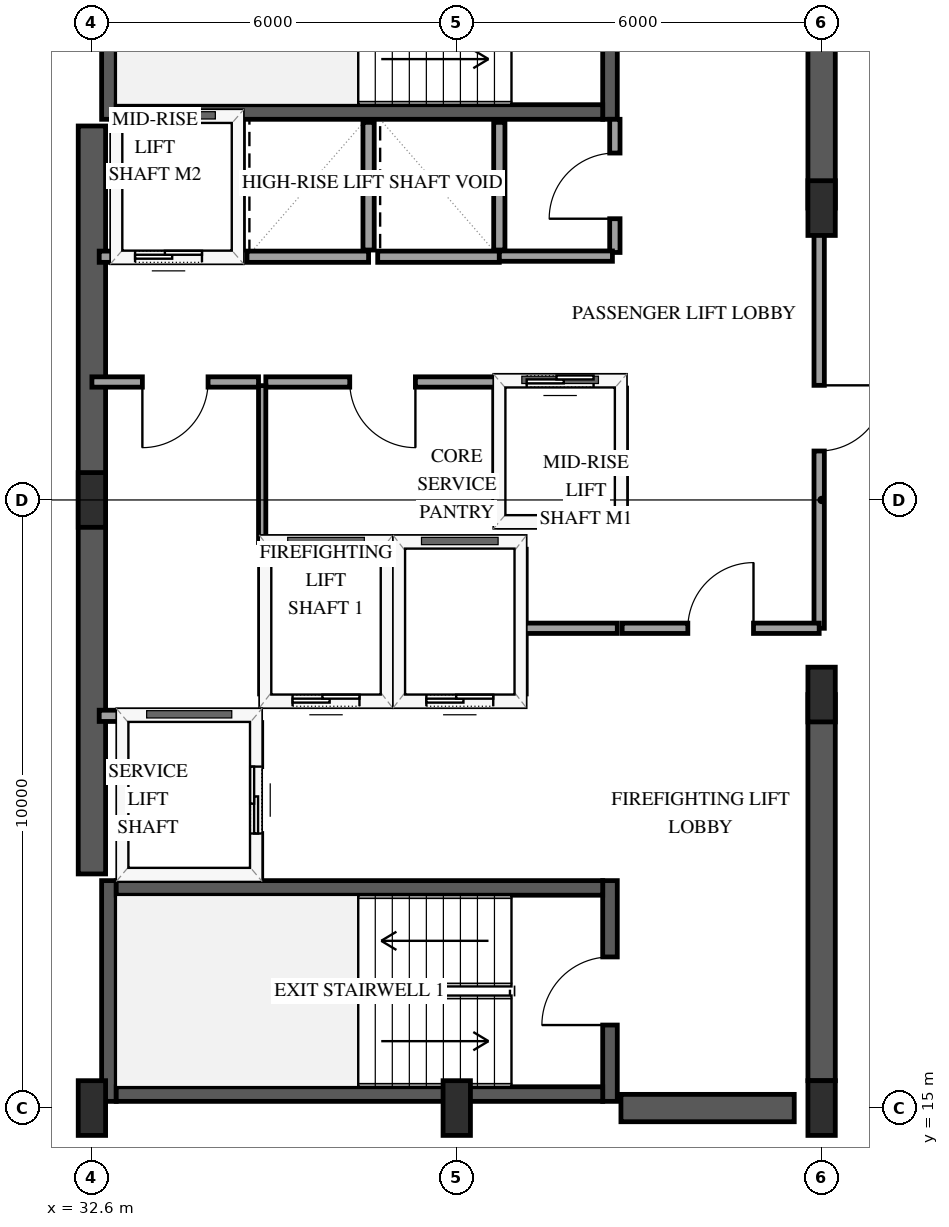
"""IFC4 building model, lengths in metres.
Left out: names, types, materials, properties, quantities, classifications, styles, units other than length and angle.
Written with IfcOpenShell. Run it as: python <this file> out.ifc"""

import sys

from ifc_helpers import new_model, si_unit, direction, frame, frame_2d, origin, origin_2d, place, context, subcontext, project, spatial, rectangle, extrude, element, fill, save


model = new_model("IFC4")
c1 = context("Model", 3, precision=1e-05, world=origin(), true_north=direction((0.0, 1.0)))
c2 = subcontext(c1, "Body", "Model", "MODEL_VIEW")
j1 = project(units=[si_unit("LENGTHUNIT", "METRE"), si_unit("PLANEANGLEUNIT", "RADIAN")], contexts=[c1])
p1 = place(None, origin())
s1 = spatial("IfcSite", under=j1, at=p1, CompositionType="ELEMENT")
p2 = place(p1, origin())
s2 = spatial("IfcBuilding", under=s1, at=p2, CompositionType="ELEMENT")
p3 = place(p2, frame((0.0, 0.0, 226.6)))
s3 = spatial("IfcBuildingStorey", under=s2, at=p3, CompositionType="ELEMENT", Elevation=226.6)
p4 = place(p3, frame((32.88, 15.11, 0.0), z_axis=(0.0, 0.0, 1.0), x_axis=(0.0, 1.0, 0.0)))
e1 = element("IfcWall", 1, at=p4, inside=s3, PredefinedType="SHEAR", context=c2, shape_type="SweptSolid", body=[
    extrude(rectangle(XDim=3.63, YDim=0.24, at=frame_2d((1.815, 0.0))), origin(), (0.0, 0.0, 1.0), 3.6),
])
p5 = place(p3, frame((41.12, 15.11, 0.0), z_axis=(0.0, 0.0, 1.0), x_axis=(0.0, 1.0, 0.0)))
e2 = element("IfcWall", 2, at=p5, inside=s3, PredefinedType="SHEAR", context=c2, shape_type="SweptSolid", body=[
    extrude(rectangle(XDim=3.63, YDim=0.24, at=frame_2d((1.815, 0.0))), origin(), (0.0, 0.0, 1.0), 3.6),
])
p6 = place(p5, frame((1.255, 0.0, 0.0)))
e3 = element("IfcOpeningElement", 3, at=p6, cuts=e2, PredefinedType="OPENING", context=c2, shape_type="SweptSolid", body=[
    extrude(rectangle(XDim=1.12, YDim=2.15, at=frame_2d((0.56, 1.075))), frame((0.0, 0.13, 0.0), z_axis=(0.0, -1.0, 0.0), x_axis=(1.0, 0.0, 0.0)), (0.0, 0.0, 1.0), 0.26),
])
for number, where, z_axis, x_axis in (
    (4, (33.0, 15.23, 0.0), (0.0, 0.0, 1.0), (1.0, 0.0, 0.0)),
    (5, (33.0, 18.62, 0.0), (0.0, 0.0, 1.0), (1.0, 0.0, 0.0)),
):
    element("IfcWall", number, at=place(p3, frame(where, z_axis=z_axis, x_axis=x_axis)), inside=s3, PredefinedType="SHEAR", context=c2, shape_type="SweptSolid", body=[
        extrude(rectangle(XDim=8.0, YDim=0.24, at=frame_2d((4.0, 0.0))), origin(), (0.0, 0.0, 1.0), 3.6),
    ])
p7 = place(p3, frame((32.88, 31.26, 0.0), z_axis=(0.0, 0.0, 1.0), x_axis=(0.0, 1.0, 0.0)))
e6 = element("IfcWall", 6, at=p7, inside=s3, PredefinedType="SHEAR", context=c2, shape_type="SweptSolid", body=[
    extrude(rectangle(XDim=3.63, YDim=0.24, at=frame_2d((1.815, 0.0))), origin(), (0.0, 0.0, 1.0), 3.6),
])
p8 = place(p3, frame((41.12, 31.26, 0.0), z_axis=(0.0, 0.0, 1.0), x_axis=(0.0, 1.0, 0.0)))
e7 = element("IfcWall", 7, at=p8, inside=s3, PredefinedType="SHEAR", context=c2, shape_type="SweptSolid", body=[
    extrude(rectangle(XDim=3.63, YDim=0.24, at=frame_2d((1.815, 0.0))), origin(), (0.0, 0.0, 1.0), 3.6),
])
p9 = place(p8, frame((1.255, 0.0, 0.0)))
e8 = element("IfcOpeningElement", 8, at=p9, cuts=e7, PredefinedType="OPENING", context=c2, shape_type="SweptSolid", body=[
    extrude(rectangle(XDim=1.12, YDim=2.15, at=frame_2d((0.56, 1.075))), frame((0.0, 0.13, 0.0), z_axis=(0.0, -1.0, 0.0), x_axis=(1.0, 0.0, 0.0)), (0.0, 0.0, 1.0), 0.26),
])
p10 = place(p3, frame((33.0, 31.38, 0.0), z_axis=(0.0, 0.0, 1.0), x_axis=(1.0, 0.0, 0.0)))
e9 = element("IfcWall", 9, at=p10, inside=s3, PredefinedType="SHEAR", context=c2, shape_type="SweptSolid", body=[
    extrude(rectangle(XDim=8.0, YDim=0.24, at=frame_2d((4.0, 0.0))), origin(), (0.0, 0.0, 1.0), 3.6),
])
p11 = place(p3, frame((32.6, 18.85, 0.0), z_axis=(0.0, 0.0, 1.0), x_axis=(0.0, 1.0, 0.0)))
e10 = element("IfcWall", 10, at=p11, inside=s3, PredefinedType="SHEAR", context=c2, shape_type="SweptSolid", body=[
    extrude(rectangle(XDim=12.3, YDim=0.45, at=frame_2d((6.15, 0.0))), origin(), (0.0, 0.0, 1.0), 3.6),
])
p12 = place(p3, frame((41.3, 15.0, 0.0), z_axis=(0.0, 0.0, 1.0), x_axis=(1.0, 0.0, 0.0)))
e11 = element("IfcWall", 11, at=p12, inside=s3, PredefinedType="SHEAR", context=c2, shape_type="SweptSolid", body=[
    extrude(rectangle(XDim=2.85, YDim=0.45, at=frame_2d((1.425, 0.0))), origin(), (0.0, 0.0, 1.0), 3.6),
])
p13 = place(p3, frame((44.6, 15.45, 0.0), z_axis=(0.0, 0.0, 1.0), x_axis=(0.0, 1.0, 0.0)))
e12 = element("IfcWall", 12, at=p13, inside=s3, PredefinedType="SHEAR", context=c2, shape_type="SweptSolid", body=[
    extrude(rectangle(XDim=6.35, YDim=0.45, at=frame_2d((3.175, 0.0))), origin(), (0.0, 0.0, 1.0), 3.6),
])
p14 = place(p3, frame((44.6, 29.8, 0.0), z_axis=(0.0, 0.0, 1.0), x_axis=(0.0, 1.0, 0.0)))
e13 = element("IfcWall", 13, at=p14, inside=s3, PredefinedType="SHEAR", context=c2, shape_type="SweptSolid", body=[
    extrude(rectangle(XDim=4.75, YDim=0.45, at=frame_2d((2.375, 0.0))), origin(), (0.0, 0.0, 1.0), 3.6),
])
for number, where, z_axis, x_axis in (
    (14, (32.6, 15.0, 0.0), (0.0, 0.0, 1.0), (1.0, 0.0, 0.0)),
    (15, (32.6, 25.0, 0.0), (0.0, 0.0, 1.0), (1.0, 0.0, 0.0)),
    (16, (38.6, 15.0, 0.0), (0.0, 0.0, 1.0), (1.0, 0.0, 0.0)),
    (17, (44.6, 15.0, 0.0), (0.0, 0.0, 1.0), (1.0, 0.0, 0.0)),
    (18, (44.6, 21.8, 0.0), (0.0, 0.0, 1.0), (1.0, 0.0, 0.0)),
    (19, (44.6, 29.8, 0.0), (0.0, 0.0, 1.0), (1.0, 0.0, 0.0)),
):
    element("IfcColumn", number, at=place(p3, frame(where, z_axis=z_axis, x_axis=x_axis)), inside=s3, PredefinedType="PILASTER", context=c2, shape_type="SweptSolid", body=[
        extrude(rectangle(XDim=0.45, YDim=0.9, at=origin_2d()), origin(), (0.0, 0.0, 1.0), 3.6),
    ])
p15 = place(p3, frame((35.45, 21.7, 0.0), z_axis=(0.0, 0.0, 1.0), x_axis=(1.0, 0.0, 0.0)))
e20 = element("IfcWall", 20, at=p15, inside=s3, PredefinedType="SOLIDWALL", context=c2, shape_type="SweptSolid", body=[
    extrude(rectangle(XDim=2.0, YDim=0.185, at=frame_2d((1.0, 0.0))), origin(), (0.0, 0.0, 1.0), 3.3),
])
p16 = place(p15, frame((0.45, 0.0, 0.0)))
e21 = element("IfcOpeningElement", 21, at=p16, cuts=e20, PredefinedType="OPENING", context=c2, shape_type="SweptSolid", body=[
    extrude(rectangle(XDim=1.1, YDim=2.15, at=frame_2d((0.55, 1.075))), frame((0.0, 0.103, 0.0), z_axis=(0.0, -1.0, 0.0), x_axis=(1.0, 0.0, 0.0)), (0.0, 0.0, 1.0), 0.205),
])
p17 = place(p3, frame((35.45, 24.3, 0.0), z_axis=(0.0, 0.0, 1.0), x_axis=(1.0, 0.0, 0.0)))
e22 = element("IfcWall", 22, at=p17, inside=s3, PredefinedType="SOLIDWALL", context=c2, shape_type="SweptSolid", body=[
    extrude(rectangle(XDim=2.0, YDim=0.185, at=frame_2d((1.0, 0.0))), origin(), (0.0, 0.0, 1.0), 3.3),
])
for number, where, z_axis, x_axis in (
    (23, (35.45, 21.81, 0.0), (0.0, 0.0, 1.0), (0.0, 1.0, 0.0)),
    (24, (37.45, 21.81, 0.0), (0.0, 0.0, 1.0), (0.0, 1.0, 0.0)),
):
    element("IfcWall", number, at=place(p3, frame(where, z_axis=z_axis, x_axis=x_axis)), inside=s3, PredefinedType="SOLIDWALL", context=c2, shape_type="SweptSolid", body=[
        extrude(rectangle(XDim=2.38, YDim=0.185, at=frame_2d((1.19, 0.0))), origin(), (0.0, 0.0, 1.0), 3.3),
    ])
p18 = place(p3, frame((37.65, 21.7, 0.0), z_axis=(0.0, 0.0, 1.0), x_axis=(1.0, 0.0, 0.0)))
e25 = element("IfcWall", 25, at=p18, inside=s3, PredefinedType="SOLIDWALL", context=c2, shape_type="SweptSolid", body=[
    extrude(rectangle(XDim=2.0, YDim=0.185, at=frame_2d((1.0, 0.0))), origin(), (0.0, 0.0, 1.0), 3.3),
])
p19 = place(p18, frame((0.45, 0.0, 0.0)))
e26 = element("IfcOpeningElement", 26, at=p19, cuts=e25, PredefinedType="OPENING", context=c2, shape_type="SweptSolid", body=[
    extrude(rectangle(XDim=1.1, YDim=2.15, at=frame_2d((0.55, 1.075))), frame((0.0, 0.103, 0.0), z_axis=(0.0, -1.0, 0.0), x_axis=(1.0, 0.0, 0.0)), (0.0, 0.0, 1.0), 0.205),
])
p20 = place(p3, frame((37.65, 24.3, 0.0), z_axis=(0.0, 0.0, 1.0), x_axis=(1.0, 0.0, 0.0)))
e27 = element("IfcWall", 27, at=p20, inside=s3, PredefinedType="SOLIDWALL", context=c2, shape_type="SweptSolid", body=[
    extrude(rectangle(XDim=2.0, YDim=0.185, at=frame_2d((1.0, 0.0))), origin(), (0.0, 0.0, 1.0), 3.3),
])
p21 = place(p3, frame((39.65, 21.81, 0.0), z_axis=(0.0, 0.0, 1.0), x_axis=(0.0, 1.0, 0.0)))
e28 = element("IfcWall", 28, at=p21, inside=s3, PredefinedType="SOLIDWALL", context=c2, shape_type="SweptSolid", body=[
    extrude(rectangle(XDim=2.38, YDim=0.185, at=frame_2d((1.19, 0.0))), origin(), (0.0, 0.0, 1.0), 3.3),
])
p22 = place(p3, frame((32.72, 21.45, 0.0), z_axis=(0.0, 0.0, 1.0), x_axis=(1.0, 0.0, 0.0)))
e29 = element("IfcWall", 29, at=p22, inside=s3, PredefinedType="SOLIDWALL", context=c2, shape_type="SweptSolid", body=[
    extrude(rectangle(XDim=2.58, YDim=0.185, at=frame_2d((1.29, 0.0))), origin(), (0.0, 0.0, 1.0), 3.3),
])
p23 = place(p3, frame((35.3, 18.79, 0.0), z_axis=(0.0, 0.0, 1.0), x_axis=(0.0, 1.0, 0.0)))
e30 = element("IfcWall", 30, at=p23, inside=s3, PredefinedType="SOLIDWALL", context=c2, shape_type="SweptSolid", body=[
    extrude(rectangle(XDim=2.55, YDim=0.185, at=frame_2d((1.275, 0.0))), origin(), (0.0, 0.0, 1.0), 3.3),
])
p24 = place(p23, frame((0.725, 0.0, 0.0)))
e31 = element("IfcOpeningElement", 31, at=p24, cuts=e30, PredefinedType="OPENING", context=c2, shape_type="SweptSolid", body=[
    extrude(rectangle(XDim=1.1, YDim=2.15, at=frame_2d((0.55, 1.075))), frame((0.0, 0.103, 0.0), z_axis=(0.0, -1.0, 0.0), x_axis=(1.0, 0.0, 0.0)), (0.0, 0.0, 1.0), 0.205),
])
p25 = place(p3, frame((39.3, 24.65, 0.0), z_axis=(0.0, 0.0, 1.0), x_axis=(1.0, 0.0, 0.0)))
e32 = element("IfcWall", 32, at=p25, inside=s3, PredefinedType="SOLIDWALL", context=c2, shape_type="SweptSolid", body=[
    extrude(rectangle(XDim=2.0, YDim=0.185, at=frame_2d((1.0, 0.0))), origin(), (0.0, 0.0, 1.0), 3.3),
])
p26 = place(p3, frame((39.3, 26.95, 0.0), z_axis=(0.0, 0.0, 1.0), x_axis=(1.0, 0.0, 0.0)))
e33 = element("IfcWall", 33, at=p26, inside=s3, PredefinedType="SOLIDWALL", context=c2, shape_type="SweptSolid", body=[
    extrude(rectangle(XDim=2.0, YDim=0.185, at=frame_2d((1.0, 0.0))), origin(), (0.0, 0.0, 1.0), 3.3),
])
p27 = place(p26, frame((0.45, 0.0, 0.0)))
e34 = element("IfcOpeningElement", 34, at=p27, cuts=e33, PredefinedType="OPENING", context=c2, shape_type="SweptSolid", body=[
    extrude(rectangle(XDim=1.1, YDim=2.15, at=frame_2d((0.55, 1.075))), frame((0.0, 0.103, 0.0), z_axis=(0.0, -1.0, 0.0), x_axis=(1.0, 0.0, 0.0)), (0.0, 0.0, 1.0), 0.205),
])
for number, where, z_axis, x_axis in (
    (35, (39.3, 24.76, 0.0), (0.0, 0.0, 1.0), (0.0, 1.0, 0.0)),
    (36, (41.3, 24.76, 0.0), (0.0, 0.0, 1.0), (0.0, 1.0, 0.0)),
):
    element("IfcWall", number, at=place(p3, frame(where, z_axis=z_axis, x_axis=x_axis)), inside=s3, PredefinedType="SOLIDWALL", context=c2, shape_type="SweptSolid", body=[
        extrude(rectangle(XDim=2.08, YDim=0.185, at=frame_2d((1.04, 0.0))), origin(), (0.0, 0.0, 1.0), 3.3),
    ])
p28 = place(p3, frame((32.72, 29.0, 0.0), z_axis=(0.0, 0.0, 1.0), x_axis=(1.0, 0.0, 0.0)))
e37 = element("IfcWall", 37, at=p28, inside=s3, PredefinedType="SOLIDWALL", context=c2, shape_type="SweptSolid", body=[
    extrude(rectangle(XDim=2.28, YDim=0.185, at=frame_2d((1.14, 0.0))), origin(), (0.0, 0.0, 1.0), 3.3),
])
p29 = place(p28, frame((0.59, 0.0, 0.0)))
e38 = element("IfcOpeningElement", 38, at=p29, cuts=e37, PredefinedType="OPENING", context=c2, shape_type="SweptSolid", body=[
    extrude(rectangle(XDim=1.1, YDim=2.15, at=frame_2d((0.55, 1.075))), frame((0.0, 0.103, 0.0), z_axis=(0.0, -1.0, 0.0), x_axis=(1.0, 0.0, 0.0)), (0.0, 0.0, 1.0), 0.205),
])
p30 = place(p3, frame((35.0, 29.11, 0.0), z_axis=(0.0, 0.0, 1.0), x_axis=(0.0, 1.0, 0.0)))
e39 = element("IfcWall", 39, at=p30, inside=s3, PredefinedType="SOLIDWALL", context=c2, shape_type="SweptSolid", body=[
    extrude(rectangle(XDim=2.1, YDim=0.185, at=frame_2d((1.05, 0.0))), origin(), (0.0, 0.0, 1.0), 3.3),
])
p31 = place(p3, frame((35.15, 29.0, 0.0), z_axis=(0.0, 0.0, 1.0), x_axis=(1.0, 0.0, 0.0)))
e40 = element("IfcWall", 40, at=p31, inside=s3, PredefinedType="SOLIDWALL", context=c2, shape_type="SweptSolid", body=[
    extrude(rectangle(XDim=2.0, YDim=0.185, at=frame_2d((1.0, 0.0))), origin(), (0.0, 0.0, 1.0), 3.3),
])
p32 = place(p3, frame((37.15, 29.11, 0.0), z_axis=(0.0, 0.0, 1.0), x_axis=(0.0, 1.0, 0.0)))
e41 = element("IfcWall", 41, at=p32, inside=s3, PredefinedType="SOLIDWALL", context=c2, shape_type="SweptSolid", body=[
    extrude(rectangle(XDim=2.1, YDim=0.185, at=frame_2d((1.05, 0.0))), origin(), (0.0, 0.0, 1.0), 3.3),
])
p33 = place(p3, frame((37.3, 29.0, 0.0), z_axis=(0.0, 0.0, 1.0), x_axis=(1.0, 0.0, 0.0)))
e42 = element("IfcWall", 42, at=p33, inside=s3, PredefinedType="SOLIDWALL", context=c2, shape_type="SweptSolid", body=[
    extrude(rectangle(XDim=2.0, YDim=0.185, at=frame_2d((1.0, 0.0))), origin(), (0.0, 0.0, 1.0), 3.3),
])
p34 = place(p3, frame((39.3, 29.11, 0.0), z_axis=(0.0, 0.0, 1.0), x_axis=(0.0, 1.0, 0.0)))
e43 = element("IfcWall", 43, at=p34, inside=s3, PredefinedType="SOLIDWALL", context=c2, shape_type="SweptSolid", body=[
    extrude(rectangle(XDim=2.1, YDim=0.185, at=frame_2d((1.05, 0.0))), origin(), (0.0, 0.0, 1.0), 3.3),
])
p35 = place(p3, frame((44.56, 29.8, 0.0), z_axis=(0.0, 0.0, 1.0), x_axis=(0.0, -1.0, 0.0)))
e44 = element("IfcWall", 44, at=p35, inside=s3, PredefinedType="PARTITIONING", context=c2, shape_type="SweptSolid", body=[
    extrude(rectangle(XDim=6.91, YDim=0.17, at=frame_2d((3.455, 0.0))), origin(), (0.0, 0.0, 1.0), 2.34),
])
p36 = place(p35, frame((2.915, 0.0, 0.0)))
e45 = element("IfcOpeningElement", 45, at=p36, cuts=e44, PredefinedType="OPENING", context=c2, shape_type="SweptSolid", body=[
    extrude(rectangle(XDim=1.08, YDim=2.15, at=frame_2d((0.54, 1.075))), frame((0.0, 0.095, 0.0), z_axis=(0.0, -1.0, 0.0), x_axis=(1.0, 0.0, 0.0)), (0.0, 0.0, 1.0), 0.19),
])
p37 = place(p3, frame((39.3, 26.94, 0.0), z_axis=(0.0, 0.0, 1.0), x_axis=(-1.0, 0.0, 0.0)))
e46 = element("IfcWall", 46, at=p37, inside=s3, PredefinedType="PARTITIONING", context=c2, shape_type="SweptSolid", body=[
    extrude(rectangle(XDim=3.84, YDim=0.17, at=frame_2d((1.92, 0.0))), origin(), (0.0, 0.0, 1.0), 3.3),
])
p38 = place(p37, frame((1.38, 0.0, 0.0)))
e47 = element("IfcOpeningElement", 47, at=p38, cuts=e46, PredefinedType="OPENING", context=c2, shape_type="SweptSolid", body=[
    extrude(rectangle(XDim=1.08, YDim=2.15, at=frame_2d((0.54, 1.075))), frame((0.0, 0.095, 0.0), z_axis=(0.0, -1.0, 0.0), x_axis=(1.0, 0.0, 0.0)), (0.0, 0.0, 1.0), 0.19),
])
p39 = place(p3, frame((41.32, 22.89, 0.0), z_axis=(0.0, 0.0, 1.0), x_axis=(1.0, 0.0, 0.0)))
e48 = element("IfcWall", 48, at=p39, inside=s3, PredefinedType="PARTITIONING", context=c2, shape_type="SweptSolid", body=[
    extrude(rectangle(XDim=3.24, YDim=0.17, at=frame_2d((1.62, 0.0))), origin(), (0.0, 0.0, 1.0), 3.3),
])
p40 = place(p39, frame((1.08, 0.0, 0.0)))
e49 = element("IfcOpeningElement", 49, at=p40, cuts=e48, PredefinedType="OPENING", context=c2, shape_type="SweptSolid", body=[
    extrude(rectangle(XDim=1.08, YDim=2.15, at=frame_2d((0.54, 1.075))), frame((0.0, 0.095, 0.0), z_axis=(0.0, -1.0, 0.0), x_axis=(1.0, 0.0, 0.0)), (0.0, 0.0, 1.0), 0.19),
])
p41 = place(p3, frame((35.34, 26.94, 0.0), z_axis=(0.0, 0.0, 1.0), x_axis=(-1.0, 0.0, 0.0)))
e50 = element("IfcWall", 50, at=p41, inside=s3, PredefinedType="PARTITIONING", context=c2, shape_type="SweptSolid", body=[
    extrude(rectangle(XDim=2.74, YDim=0.17, at=frame_2d((1.37, 0.0))), origin(), (0.0, 0.0, 1.0), 3.3),
])
p42 = place(p41, frame((0.83, 0.0, 0.0)))
e51 = element("IfcOpeningElement", 51, at=p42, cuts=e50, PredefinedType="OPENING", context=c2, shape_type="SweptSolid", body=[
    extrude(rectangle(XDim=1.08, YDim=2.15, at=frame_2d((0.54, 1.075))), frame((0.0, 0.095, 0.0), z_axis=(0.0, -1.0, 0.0), x_axis=(1.0, 0.0, 0.0)), (0.0, 0.0, 1.0), 0.19),
])
p43 = place(p3, frame((35.4, 26.88, 0.0), z_axis=(0.0, 0.0, 1.0), x_axis=(0.0, -1.0, 0.0)))
e52 = element("IfcWall", 52, at=p43, inside=s3, PredefinedType="PARTITIONING", context=c2, shape_type="SweptSolid", body=[
    extrude(rectangle(XDim=2.58, YDim=0.12, at=frame_2d((1.29, 0.0))), origin(), (0.0, 0.0, 1.0), 3.3),
])
p44 = place(p3, frame((41.2, 29.07, 0.0), z_axis=(0.0, 0.0, 1.0), x_axis=(0.0, 1.0, 0.0)))
e53 = element("IfcWall", 53, at=p44, inside=s3, PredefinedType="PARTITIONING", context=c2, shape_type="SweptSolid", body=[
    extrude(rectangle(XDim=2.19, YDim=0.17, at=frame_2d((1.095, 0.0))), origin(), (0.0, 0.0, 1.0), 3.3),
])
p45 = place(p44, frame((0.555, 0.0, 0.0)))
e54 = element("IfcOpeningElement", 54, at=p45, cuts=e53, PredefinedType="OPENING", context=c2, shape_type="SweptSolid", body=[
    extrude(rectangle(XDim=1.08, YDim=2.15, at=frame_2d((0.54, 1.075))), frame((0.0, 0.095, 0.0), z_axis=(0.0, -1.0, 0.0), x_axis=(1.0, 0.0, 0.0)), (0.0, 0.0, 1.0), 0.19),
])
p46 = place(p3, frame((39.3, 29.01, 0.0), z_axis=(0.0, 0.0, 1.0), x_axis=(1.0, 0.0, 0.0)))
e55 = element("IfcWall", 55, at=p46, inside=s3, PredefinedType="PARTITIONING", context=c2, shape_type="SweptSolid", body=[
    extrude(rectangle(XDim=1.86, YDim=0.17, at=frame_2d((0.93, 0.0))), origin(), (0.0, 0.0, 1.0), 3.3),
])
p47 = place(p3, frame((39.72, 22.89, 0.0), z_axis=(0.0, 0.0, 1.0), x_axis=(1.0, 0.0, 0.0)))
e56 = element("IfcWall", 56, at=p47, inside=s3, PredefinedType="PARTITIONING", context=c2, shape_type="SweptSolid", body=[
    extrude(rectangle(XDim=1.52, YDim=0.17, at=frame_2d((0.76, 0.0))), origin(), (0.0, 0.0, 1.0), 3.3),
])
p48 = place(p16, origin())
e57 = element("IfcDoor", 57, at=p48, inside=s3, OperationType="SLIDING_TO_LEFT", PredefinedType="DOOR", context=c2, shape_type="SweptSolid", body=[
    extrude(rectangle(XDim=1.1, YDim=2.15, at=frame_2d((0.55, 1.075))), frame((0.0, 0.025, 0.0), z_axis=(0.0, -1.0, 0.0), x_axis=(1.0, 0.0, 0.0)), (0.0, 0.0, 1.0), 0.05),
])
fill(e21, e57)
p49 = place(p19, origin())
e58 = element("IfcDoor", 58, at=p49, inside=s3, OperationType="SLIDING_TO_LEFT", PredefinedType="DOOR", context=c2, shape_type="SweptSolid", body=[
    extrude(rectangle(XDim=1.1, YDim=2.15, at=frame_2d((0.55, 1.075))), frame((0.0, 0.025, 0.0), z_axis=(0.0, -1.0, 0.0), x_axis=(1.0, 0.0, 0.0)), (0.0, 0.0, 1.0), 0.05),
])
fill(e26, e58)
p50 = place(p24, origin())
e59 = element("IfcDoor", 59, at=p50, inside=s3, OperationType="SLIDING_TO_LEFT", PredefinedType="DOOR", context=c2, shape_type="SweptSolid", body=[
    extrude(rectangle(XDim=1.1, YDim=2.15, at=frame_2d((0.55, 1.075))), frame((0.0, 0.025, 0.0), z_axis=(0.0, -1.0, 0.0), x_axis=(1.0, 0.0, 0.0)), (0.0, 0.0, 1.0), 0.05),
])
fill(e31, e59)
p51 = place(p27, origin())
e60 = element("IfcDoor", 60, at=p51, inside=s3, OperationType="SLIDING_TO_LEFT", PredefinedType="DOOR", context=c2, shape_type="SweptSolid", body=[
    extrude(rectangle(XDim=1.1, YDim=2.15, at=frame_2d((0.55, 1.075))), frame((0.0, 0.025, 0.0), z_axis=(0.0, -1.0, 0.0), x_axis=(1.0, 0.0, 0.0)), (0.0, 0.0, 1.0), 0.05),
])
fill(e34, e60)
p52 = place(p29, origin())
e61 = element("IfcDoor", 61, at=p52, inside=s3, OperationType="SLIDING_TO_LEFT", PredefinedType="DOOR", context=c2, shape_type="SweptSolid", body=[
    extrude(rectangle(XDim=1.1, YDim=2.15, at=frame_2d((0.55, 1.075))), frame((0.0, 0.025, 0.0), z_axis=(0.0, -1.0, 0.0), x_axis=(1.0, 0.0, 0.0)), (0.0, 0.0, 1.0), 0.05),
])
fill(e38, e61)
p53 = place(p6, origin())
e62 = element("IfcDoor", 62, at=p53, inside=s3, OperationType="SINGLE_SWING_LEFT", PredefinedType="DOOR", context=c2, shape_type="SweptSolid", body=[
    extrude(rectangle(XDim=1.12, YDim=2.15, at=frame_2d((0.56, 1.075))), frame((0.0, 0.025, 0.0), z_axis=(0.0, -1.0, 0.0), x_axis=(1.0, 0.0, 0.0)), (0.0, 0.0, 1.0), 0.05),
])
fill(e3, e62)
p54 = place(p36, origin())
e63 = element("IfcDoor", 63, at=p54, inside=s3, OperationType="SINGLE_SWING_LEFT", PredefinedType="DOOR", context=c2, shape_type="SweptSolid", body=[
    extrude(rectangle(XDim=1.08, YDim=2.15, at=frame_2d((0.54, 1.075))), frame((0.0, 0.025, 0.0), z_axis=(0.0, -1.0, 0.0), x_axis=(1.0, 0.0, 0.0)), (0.0, 0.0, 1.0), 0.05),
])
fill(e45, e63)
p55 = place(p38, origin())
e64 = element("IfcDoor", 64, at=p55, inside=s3, OperationType="SINGLE_SWING_LEFT", PredefinedType="DOOR", context=c2, shape_type="SweptSolid", body=[
    extrude(rectangle(XDim=1.08, YDim=2.15, at=frame_2d((0.54, 1.075))), frame((0.0, 0.025, 0.0), z_axis=(0.0, -1.0, 0.0), x_axis=(1.0, 0.0, 0.0)), (0.0, 0.0, 1.0), 0.05),
])
fill(e47, e64)
p56 = place(p40, origin())
e65 = element("IfcDoor", 65, at=p56, inside=s3, OperationType="SINGLE_SWING_RIGHT", PredefinedType="DOOR", context=c2, shape_type="SweptSolid", body=[
    extrude(rectangle(XDim=1.08, YDim=2.15, at=frame_2d((0.54, 1.075))), frame((0.0, 0.025, 0.0), z_axis=(0.0, -1.0, 0.0), x_axis=(1.0, 0.0, 0.0)), (0.0, 0.0, 1.0), 0.05),
])
fill(e49, e65)
p57 = place(p42, origin())
e66 = element("IfcDoor", 66, at=p57, inside=s3, OperationType="SINGLE_SWING_RIGHT", PredefinedType="DOOR", context=c2, shape_type="SweptSolid", body=[
    extrude(rectangle(XDim=1.08, YDim=2.15, at=frame_2d((0.54, 1.075))), frame((0.0, 0.025, 0.0), z_axis=(0.0, -1.0, 0.0), x_axis=(1.0, 0.0, 0.0)), (0.0, 0.0, 1.0), 0.05),
])
fill(e51, e66)
p58 = place(p45, origin())
e67 = element("IfcDoor", 67, at=p58, inside=s3, OperationType="SINGLE_SWING_LEFT", PredefinedType="DOOR", context=c2, shape_type="SweptSolid", body=[
    extrude(rectangle(XDim=1.08, YDim=2.15, at=frame_2d((0.54, 1.075))), frame((0.0, 0.025, 0.0), z_axis=(0.0, -1.0, 0.0), x_axis=(1.0, 0.0, 0.0)), (0.0, 0.0, 1.0), 0.05),
])
fill(e54, e67)
save(model, sys.argv[1])
